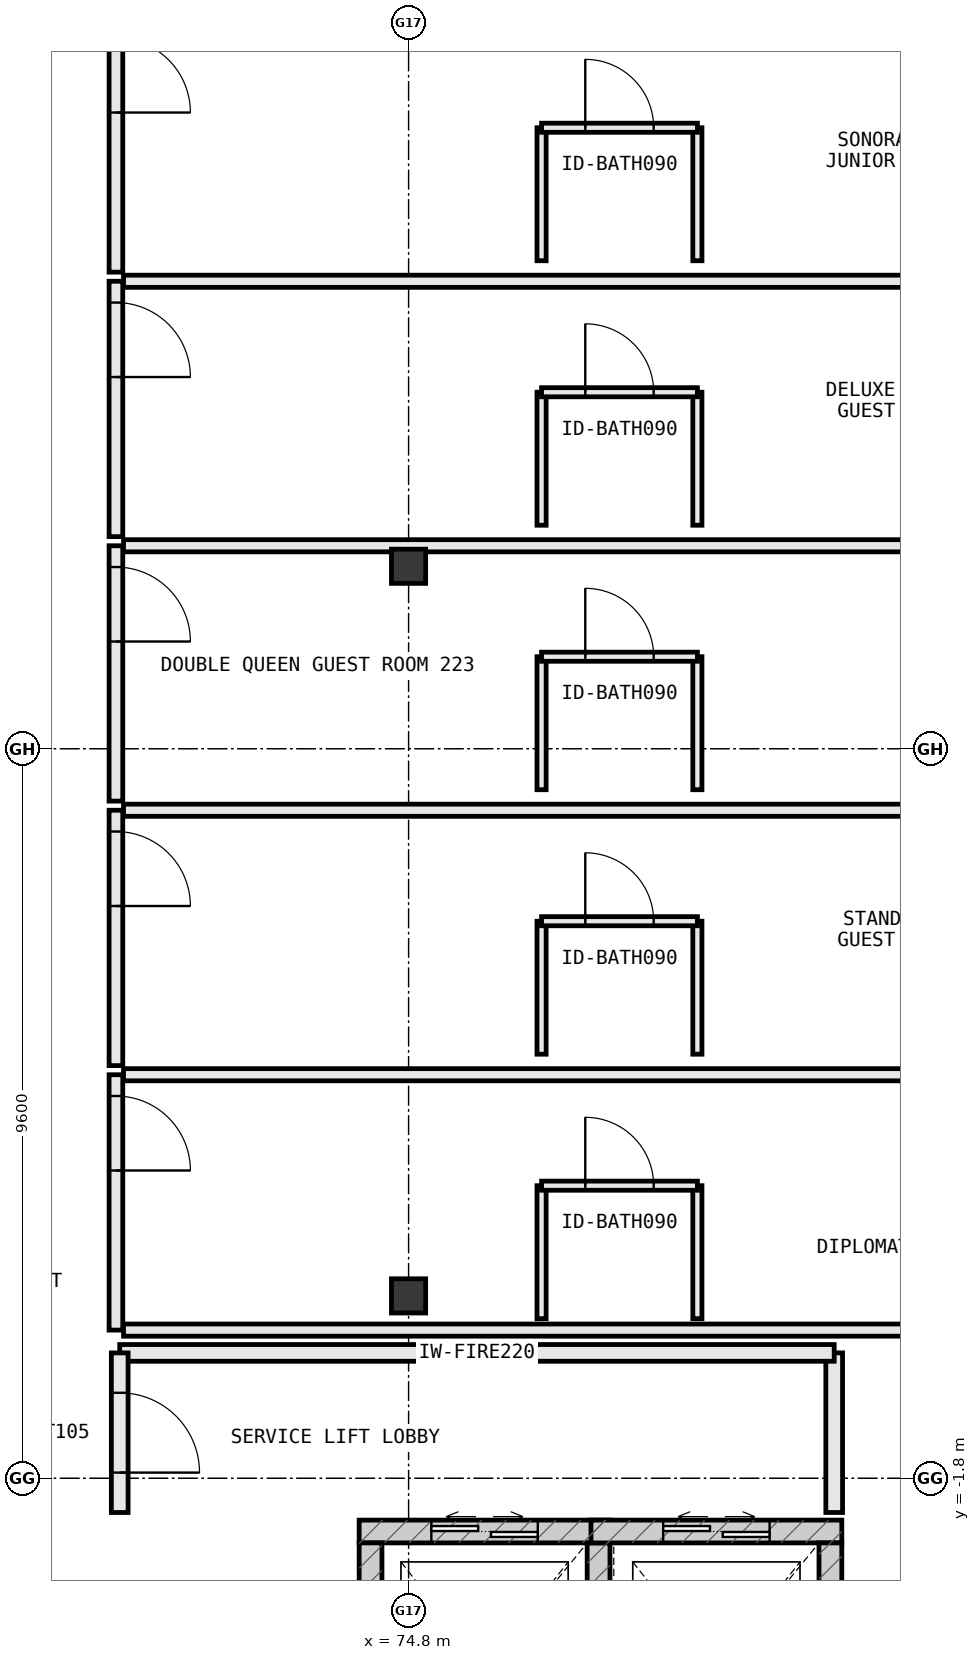
"""IFC4 building model, lengths in metres.
Left out: names, types, materials, properties, quantities, classifications, styles, units other than length and angle.
Written with IfcOpenShell. Run it as: python <this file> out.ifc"""

import sys

from ifc_helpers import new_model, si_unit, direction, frame, frame_2d, origin, origin_2d, place, context, subcontext, project, spatial, rectangle, extrude, element, fill, save


model = new_model("IFC4")
c1 = context("Model", 3, precision=1e-05, world=origin(), true_north=direction((0.0, 1.0)))
c2 = subcontext(c1, "Body", "Model", "MODEL_VIEW")
j1 = project(units=[si_unit("LENGTHUNIT", "METRE"), si_unit("PLANEANGLEUNIT", "RADIAN")], contexts=[c1])
p1 = place(None, origin())
s1 = spatial("IfcSite", under=j1, at=p1, CompositionType="ELEMENT")
p2 = place(p1, origin())
s2 = spatial("IfcBuilding", under=s1, at=p2, CompositionType="ELEMENT")
p3 = place(p2, frame((0.0, 0.0, 31.4)))
s3 = spatial("IfcBuildingStorey", under=s2, at=p3, CompositionType="ELEMENT", Elevation=31.4)
for number, where, z_axis, x_axis in (
    (1, (74.8, 0.6, 0.0), (0.0, 0.0, 1.0), (1.0, 0.0, 0.0)),
    (2, (74.8, 10.2, 0.0), (0.0, 0.0, 1.0), (1.0, 0.0, 0.0)),
):
    element("IfcColumn", number, at=place(p3, frame(where, z_axis=z_axis, x_axis=x_axis)), inside=s3, PredefinedType="COLUMN", context=c2, shape_type="SweptSolid", body=[
        extrude(rectangle(XDim=0.45, YDim=0.45, at=origin_2d()), origin(), (0.0, 0.0, 1.0), 3.8),
    ])
p4 = place(p3, frame((77.45, -2.5, 0.0), z_axis=(0.0, 0.0, 1.0), x_axis=(-1.0, 0.0, 0.0)))
e3 = element("IfcWall", 3, at=p4, inside=s3, PredefinedType="SHEAR", context=c2, shape_type="SweptSolid", body=[
    extrude(rectangle(XDim=3.3, YDim=0.3, at=frame_2d((1.65, 0.0))), origin(), (0.0, 0.0, 1.0), 3.8),
])
p5 = place(p4, frame((0.95, 0.0, 0.0)))
e4 = element("IfcOpeningElement", 4, at=p5, cuts=e3, PredefinedType="OPENING", context=c2, shape_type="SweptSolid", body=[
    extrude(rectangle(XDim=1.4, YDim=2.2, at=frame_2d((0.7, 1.1))), frame((0.0, 0.162, 0.0), z_axis=(0.0, -1.0, 0.0), x_axis=(1.0, 0.0, 0.0)), (0.0, 0.0, 1.0), 0.324),
])
for number, where, z_axis, x_axis in (
    (5, (77.3, -5.95, 0.0), (0.0, 0.0, 1.0), (0.0, 1.0, 0.0)),
    (6, (74.3, -2.65, 0.0), (0.0, 0.0, 1.0), (0.0, -1.0, 0.0)),
):
    element("IfcWall", number, at=place(p3, frame(where, z_axis=z_axis, x_axis=x_axis)), inside=s3, PredefinedType="SHEAR", context=c2, shape_type="SweptSolid", body=[
        extrude(rectangle(XDim=3.3, YDim=0.3, at=frame_2d((1.65, 0.0))), origin(), (0.0, 0.0, 1.0), 3.8),
    ])
p6 = place(p3, frame((80.5, -2.5, 0.0), z_axis=(0.0, 0.0, 1.0), x_axis=(-1.0, 0.0, 0.0)))
e7 = element("IfcWall", 7, at=p6, inside=s3, PredefinedType="SHEAR", context=c2, shape_type="SweptSolid", body=[
    extrude(rectangle(XDim=3.3, YDim=0.3, at=frame_2d((1.65, 0.0))), origin(), (0.0, 0.0, 1.0), 3.8),
])
p7 = place(p6, frame((0.95, 0.0, 0.0)))
e8 = element("IfcOpeningElement", 8, at=p7, cuts=e7, PredefinedType="OPENING", context=c2, shape_type="SweptSolid", body=[
    extrude(rectangle(XDim=1.4, YDim=2.2, at=frame_2d((0.7, 1.1))), frame((0.0, 0.162, 0.0), z_axis=(0.0, -1.0, 0.0), x_axis=(1.0, 0.0, 0.0)), (0.0, 0.0, 1.0), 0.324),
])
p8 = place(p3, frame((80.35, -5.95, 0.0), z_axis=(0.0, 0.0, 1.0), x_axis=(0.0, 1.0, 0.0)))
e9 = element("IfcWall", 9, at=p8, inside=s3, PredefinedType="SHEAR", context=c2, shape_type="SweptSolid", body=[
    extrude(rectangle(XDim=3.3, YDim=0.3, at=frame_2d((1.65, 0.0))), origin(), (0.0, 0.0, 1.0), 3.8),
])
p9 = place(p3, frame((80.4, -2.25, 0.0), z_axis=(0.0, 0.0, 1.0), x_axis=(0.0, 1.0, 0.0)))
e10 = element("IfcWall", 10, at=p9, inside=s3, PredefinedType="STANDARD", context=c2, shape_type="SweptSolid", body=[
    extrude(rectangle(XDim=2.1, YDim=0.22, at=frame_2d((1.05, 0.0))), origin(), (0.0, 0.0, 1.0), 3.555),
])
p10 = place(p3, frame((80.4, -0.15, 0.0), z_axis=(0.0, 0.0, 1.0), x_axis=(-1.0, 0.0, 0.0)))
e11 = element("IfcWall", 11, at=p10, inside=s3, PredefinedType="STANDARD", context=c2, shape_type="SweptSolid", body=[
    extrude(rectangle(XDim=9.4, YDim=0.22, at=frame_2d((4.7, 0.0))), origin(), (0.0, 0.0, 1.0), 3.555),
])
p11 = place(p3, frame((71.0, -0.15, 0.0), z_axis=(0.0, 0.0, 1.0), x_axis=(0.0, -1.0, 0.0)))
e12 = element("IfcWall", 12, at=p11, inside=s3, PredefinedType="STANDARD", context=c2, shape_type="SweptSolid", body=[
    extrude(rectangle(XDim=2.1, YDim=0.22, at=frame_2d((1.05, 0.0))), origin(), (0.0, 0.0, 1.0), 3.555),
])
p12 = place(p11, frame((0.525, 0.0, 0.0)))
e13 = element("IfcOpeningElement", 13, at=p12, cuts=e12, PredefinedType="OPENING", context=c2, shape_type="SweptSolid", body=[
    extrude(rectangle(XDim=1.05, YDim=2.2, at=frame_2d((0.525, 1.1))), frame((0.0, 0.122, 0.0), z_axis=(0.0, -1.0, 0.0), x_axis=(1.0, 0.0, 0.0)), (0.0, 0.0, 1.0), 0.244),
])
p13 = place(p3, frame((70.95, 3.51, 0.0), z_axis=(0.0, 0.0, 1.0), x_axis=(0.0, -1.0, 0.0)))
e14 = element("IfcWall", 14, at=p13, inside=s3, PredefinedType="PARTITIONING", context=c2, shape_type="SweptSolid", body=[
    extrude(rectangle(XDim=3.36, YDim=0.18, at=frame_2d((1.68, 0.0))), origin(), (0.0, 0.0, 1.0), 3.555),
])
p14 = place(p13, frame((0.28, 0.0, 0.0)))
e15 = element("IfcOpeningElement", 15, at=p14, cuts=e14, PredefinedType="OPENING", context=c2, shape_type="SweptSolid", body=[
    extrude(rectangle(XDim=0.98, YDim=2.18, at=frame_2d((0.49, 1.09))), frame((0.0, 0.102, 0.0), z_axis=(0.0, -1.0, 0.0), x_axis=(1.0, 0.0, 0.0)), (0.0, 0.0, 1.0), 0.204),
])
for number, where, z_axis, x_axis in (
    (16, (71.05, 0.15, 0.0), (0.0, 0.0, 1.0), (1.0, 0.0, 0.0)),
    (17, (71.05, 3.51, 0.0), (0.0, 0.0, 1.0), (1.0, 0.0, 0.0)),
):
    element("IfcWall", number, at=place(p3, frame(where, z_axis=z_axis, x_axis=x_axis)), inside=s3, PredefinedType="PARTITIONING", context=c2, shape_type="SweptSolid", body=[
        extrude(rectangle(XDim=12.79, YDim=0.16, at=frame_2d((6.395, 0.0))), origin(), (0.0, 0.0, 1.0), 3.555),
    ])
for number, where, z_axis, x_axis in (
    (18, (76.55, 0.3, 0.0), (0.0, 0.0, 1.0), (0.0, 1.0, 0.0)),
    (19, (78.6, 0.3, 0.0), (0.0, 0.0, 1.0), (0.0, 1.0, 0.0)),
):
    element("IfcWall", number, at=place(p3, frame(where, z_axis=z_axis, x_axis=x_axis)), inside=s3, PredefinedType="PARTITIONING", context=c2, shape_type="SweptSolid", body=[
        extrude(rectangle(XDim=1.75, YDim=0.12, at=frame_2d((0.875, 0.0))), origin(), (0.0, 0.0, 1.0), 3.555),
    ])
p15 = place(p3, frame((76.55, 2.05, 0.0), z_axis=(0.0, 0.0, 1.0), x_axis=(1.0, 0.0, 0.0)))
e20 = element("IfcWall", 20, at=p15, inside=s3, PredefinedType="PARTITIONING", context=c2, shape_type="SweptSolid", body=[
    extrude(rectangle(XDim=2.05, YDim=0.12, at=frame_2d((1.025, 0.0))), origin(), (0.0, 0.0, 1.0), 3.555),
])
p16 = place(p15, frame((0.575, 0.0, 0.0)))
e21 = element("IfcOpeningElement", 21, at=p16, cuts=e20, PredefinedType="OPENING", context=c2, shape_type="SweptSolid", body=[
    extrude(rectangle(XDim=0.9, YDim=2.15, at=frame_2d((0.45, 1.075))), frame((0.0, 0.072, 0.0), z_axis=(0.0, -1.0, 0.0), x_axis=(1.0, 0.0, 0.0)), (0.0, 0.0, 1.0), 0.144),
])
p17 = place(p3, frame((70.95, 6.99, 0.0), z_axis=(0.0, 0.0, 1.0), x_axis=(0.0, -1.0, 0.0)))
e22 = element("IfcWall", 22, at=p17, inside=s3, PredefinedType="PARTITIONING", context=c2, shape_type="SweptSolid", body=[
    extrude(rectangle(XDim=3.36, YDim=0.18, at=frame_2d((1.68, 0.0))), origin(), (0.0, 0.0, 1.0), 3.555),
])
p18 = place(p17, frame((0.28, 0.0, 0.0)))
e23 = element("IfcOpeningElement", 23, at=p18, cuts=e22, PredefinedType="OPENING", context=c2, shape_type="SweptSolid", body=[
    extrude(rectangle(XDim=0.98, YDim=2.18, at=frame_2d((0.49, 1.09))), frame((0.0, 0.102, 0.0), z_axis=(0.0, -1.0, 0.0), x_axis=(1.0, 0.0, 0.0)), (0.0, 0.0, 1.0), 0.204),
])
p19 = place(p3, frame((71.05, 6.99, 0.0), z_axis=(0.0, 0.0, 1.0), x_axis=(1.0, 0.0, 0.0)))
e24 = element("IfcWall", 24, at=p19, inside=s3, PredefinedType="PARTITIONING", context=c2, shape_type="SweptSolid", body=[
    extrude(rectangle(XDim=12.79, YDim=0.16, at=frame_2d((6.395, 0.0))), origin(), (0.0, 0.0, 1.0), 3.555),
])
for number, where, z_axis, x_axis in (
    (25, (76.55, 3.78, 0.0), (0.0, 0.0, 1.0), (0.0, 1.0, 0.0)),
    (26, (78.6, 3.78, 0.0), (0.0, 0.0, 1.0), (0.0, 1.0, 0.0)),
):
    element("IfcWall", number, at=place(p3, frame(where, z_axis=z_axis, x_axis=x_axis)), inside=s3, PredefinedType="PARTITIONING", context=c2, shape_type="SweptSolid", body=[
        extrude(rectangle(XDim=1.75, YDim=0.12, at=frame_2d((0.875, 0.0))), origin(), (0.0, 0.0, 1.0), 3.555),
    ])
p20 = place(p3, frame((76.55, 5.53, 0.0), z_axis=(0.0, 0.0, 1.0), x_axis=(1.0, 0.0, 0.0)))
e27 = element("IfcWall", 27, at=p20, inside=s3, PredefinedType="PARTITIONING", context=c2, shape_type="SweptSolid", body=[
    extrude(rectangle(XDim=2.05, YDim=0.12, at=frame_2d((1.025, 0.0))), origin(), (0.0, 0.0, 1.0), 3.555),
])
p21 = place(p20, frame((0.575, 0.0, 0.0)))
e28 = element("IfcOpeningElement", 28, at=p21, cuts=e27, PredefinedType="OPENING", context=c2, shape_type="SweptSolid", body=[
    extrude(rectangle(XDim=0.9, YDim=2.15, at=frame_2d((0.45, 1.075))), frame((0.0, 0.072, 0.0), z_axis=(0.0, -1.0, 0.0), x_axis=(1.0, 0.0, 0.0)), (0.0, 0.0, 1.0), 0.144),
])
p22 = place(p3, frame((70.95, 10.47, 0.0), z_axis=(0.0, 0.0, 1.0), x_axis=(0.0, -1.0, 0.0)))
e29 = element("IfcWall", 29, at=p22, inside=s3, PredefinedType="PARTITIONING", context=c2, shape_type="SweptSolid", body=[
    extrude(rectangle(XDim=3.36, YDim=0.18, at=frame_2d((1.68, 0.0))), origin(), (0.0, 0.0, 1.0), 3.555),
])
p23 = place(p22, frame((0.28, 0.0, 0.0)))
e30 = element("IfcOpeningElement", 30, at=p23, cuts=e29, PredefinedType="OPENING", context=c2, shape_type="SweptSolid", body=[
    extrude(rectangle(XDim=0.98, YDim=2.18, at=frame_2d((0.49, 1.09))), frame((0.0, 0.102, 0.0), z_axis=(0.0, -1.0, 0.0), x_axis=(1.0, 0.0, 0.0)), (0.0, 0.0, 1.0), 0.204),
])
p24 = place(p3, frame((71.05, 10.47, 0.0), z_axis=(0.0, 0.0, 1.0), x_axis=(1.0, 0.0, 0.0)))
e31 = element("IfcWall", 31, at=p24, inside=s3, PredefinedType="PARTITIONING", context=c2, shape_type="SweptSolid", body=[
    extrude(rectangle(XDim=12.79, YDim=0.16, at=frame_2d((6.395, 0.0))), origin(), (0.0, 0.0, 1.0), 2.93),
])
for number, where, z_axis, x_axis in (
    (32, (76.55, 7.26, 0.0), (0.0, 0.0, 1.0), (0.0, 1.0, 0.0)),
    (33, (78.6, 7.26, 0.0), (0.0, 0.0, 1.0), (0.0, 1.0, 0.0)),
):
    element("IfcWall", number, at=place(p3, frame(where, z_axis=z_axis, x_axis=x_axis)), inside=s3, PredefinedType="PARTITIONING", context=c2, shape_type="SweptSolid", body=[
        extrude(rectangle(XDim=1.75, YDim=0.12, at=frame_2d((0.875, 0.0))), origin(), (0.0, 0.0, 1.0), 3.555),
    ])
p25 = place(p3, frame((76.55, 9.01, 0.0), z_axis=(0.0, 0.0, 1.0), x_axis=(1.0, 0.0, 0.0)))
e34 = element("IfcWall", 34, at=p25, inside=s3, PredefinedType="PARTITIONING", context=c2, shape_type="SweptSolid", body=[
    extrude(rectangle(XDim=2.05, YDim=0.12, at=frame_2d((1.025, 0.0))), origin(), (0.0, 0.0, 1.0), 3.555),
])
p26 = place(p25, frame((0.575, 0.0, 0.0)))
e35 = element("IfcOpeningElement", 35, at=p26, cuts=e34, PredefinedType="OPENING", context=c2, shape_type="SweptSolid", body=[
    extrude(rectangle(XDim=0.9, YDim=2.15, at=frame_2d((0.45, 1.075))), frame((0.0, 0.072, 0.0), z_axis=(0.0, -1.0, 0.0), x_axis=(1.0, 0.0, 0.0)), (0.0, 0.0, 1.0), 0.144),
])
p27 = place(p3, frame((70.95, 13.95, 0.0), z_axis=(0.0, 0.0, 1.0), x_axis=(0.0, -1.0, 0.0)))
e36 = element("IfcWall", 36, at=p27, inside=s3, PredefinedType="PARTITIONING", context=c2, shape_type="SweptSolid", body=[
    extrude(rectangle(XDim=3.36, YDim=0.18, at=frame_2d((1.68, 0.0))), origin(), (0.0, 0.0, 1.0), 3.555),
])
p28 = place(p27, frame((0.28, 0.0, 0.0)))
e37 = element("IfcOpeningElement", 37, at=p28, cuts=e36, PredefinedType="OPENING", context=c2, shape_type="SweptSolid", body=[
    extrude(rectangle(XDim=0.98, YDim=2.18, at=frame_2d((0.49, 1.09))), frame((0.0, 0.102, 0.0), z_axis=(0.0, -1.0, 0.0), x_axis=(1.0, 0.0, 0.0)), (0.0, 0.0, 1.0), 0.204),
])
p29 = place(p3, frame((71.05, 13.95, 0.0), z_axis=(0.0, 0.0, 1.0), x_axis=(1.0, 0.0, 0.0)))
e38 = element("IfcWall", 38, at=p29, inside=s3, PredefinedType="PARTITIONING", context=c2, shape_type="SweptSolid", body=[
    extrude(rectangle(XDim=12.79, YDim=0.16, at=frame_2d((6.395, 0.0))), origin(), (0.0, 0.0, 1.0), 3.555),
])
for number, where, z_axis, x_axis in (
    (39, (76.55, 10.74, 0.0), (0.0, 0.0, 1.0), (0.0, 1.0, 0.0)),
    (40, (78.6, 10.74, 0.0), (0.0, 0.0, 1.0), (0.0, 1.0, 0.0)),
):
    element("IfcWall", number, at=place(p3, frame(where, z_axis=z_axis, x_axis=x_axis)), inside=s3, PredefinedType="PARTITIONING", context=c2, shape_type="SweptSolid", body=[
        extrude(rectangle(XDim=1.75, YDim=0.12, at=frame_2d((0.875, 0.0))), origin(), (0.0, 0.0, 1.0), 3.555),
    ])
p30 = place(p3, frame((76.55, 12.49, 0.0), z_axis=(0.0, 0.0, 1.0), x_axis=(1.0, 0.0, 0.0)))
e41 = element("IfcWall", 41, at=p30, inside=s3, PredefinedType="PARTITIONING", context=c2, shape_type="SweptSolid", body=[
    extrude(rectangle(XDim=2.05, YDim=0.12, at=frame_2d((1.025, 0.0))), origin(), (0.0, 0.0, 1.0), 3.555),
])
p31 = place(p30, frame((0.575, 0.0, 0.0)))
e42 = element("IfcOpeningElement", 42, at=p31, cuts=e41, PredefinedType="OPENING", context=c2, shape_type="SweptSolid", body=[
    extrude(rectangle(XDim=0.9, YDim=2.15, at=frame_2d((0.45, 1.075))), frame((0.0, 0.072, 0.0), z_axis=(0.0, -1.0, 0.0), x_axis=(1.0, 0.0, 0.0)), (0.0, 0.0, 1.0), 0.144),
])
p32 = place(p3, frame((70.95, 17.43, 0.0), z_axis=(0.0, 0.0, 1.0), x_axis=(0.0, -1.0, 0.0)))
e43 = element("IfcWall", 43, at=p32, inside=s3, PredefinedType="PARTITIONING", context=c2, shape_type="SweptSolid", body=[
    extrude(rectangle(XDim=3.36, YDim=0.18, at=frame_2d((1.68, 0.0))), origin(), (0.0, 0.0, 1.0), 3.555),
])
p33 = place(p32, frame((0.28, 0.0, 0.0)))
e44 = element("IfcOpeningElement", 44, at=p33, cuts=e43, PredefinedType="OPENING", context=c2, shape_type="SweptSolid", body=[
    extrude(rectangle(XDim=0.98, YDim=2.18, at=frame_2d((0.49, 1.09))), frame((0.0, 0.102, 0.0), z_axis=(0.0, -1.0, 0.0), x_axis=(1.0, 0.0, 0.0)), (0.0, 0.0, 1.0), 0.204),
])
for number, where, z_axis, x_axis in (
    (45, (76.55, 14.22, 0.0), (0.0, 0.0, 1.0), (0.0, 1.0, 0.0)),
    (46, (78.6, 14.22, 0.0), (0.0, 0.0, 1.0), (0.0, 1.0, 0.0)),
):
    element("IfcWall", number, at=place(p3, frame(where, z_axis=z_axis, x_axis=x_axis)), inside=s3, PredefinedType="PARTITIONING", context=c2, shape_type="SweptSolid", body=[
        extrude(rectangle(XDim=1.75, YDim=0.12, at=frame_2d((0.875, 0.0))), origin(), (0.0, 0.0, 1.0), 3.555),
    ])
p34 = place(p3, frame((76.55, 15.97, 0.0), z_axis=(0.0, 0.0, 1.0), x_axis=(1.0, 0.0, 0.0)))
e47 = element("IfcWall", 47, at=p34, inside=s3, PredefinedType="PARTITIONING", context=c2, shape_type="SweptSolid", body=[
    extrude(rectangle(XDim=2.05, YDim=0.12, at=frame_2d((1.025, 0.0))), origin(), (0.0, 0.0, 1.0), 3.555),
])
p35 = place(p34, frame((0.575, 0.0, 0.0)))
e48 = element("IfcOpeningElement", 48, at=p35, cuts=e47, PredefinedType="OPENING", context=c2, shape_type="SweptSolid", body=[
    extrude(rectangle(XDim=0.9, YDim=2.15, at=frame_2d((0.45, 1.075))), frame((0.0, 0.072, 0.0), z_axis=(0.0, -1.0, 0.0), x_axis=(1.0, 0.0, 0.0)), (0.0, 0.0, 1.0), 0.144),
])
p36 = place(p5, origin())
e49 = element("IfcDoor", 49, at=p36, inside=s3, OperationType="DOUBLE_DOOR_SLIDING", PredefinedType="DOOR", context=c2, shape_type="SweptSolid", body=[
    extrude(rectangle(XDim=1.4, YDim=2.2, at=frame_2d((0.7, 1.1))), frame((0.0, 0.025, 0.0), z_axis=(0.0, -1.0, 0.0), x_axis=(1.0, 0.0, 0.0)), (0.0, 0.0, 1.0), 0.05),
])
fill(e4, e49)
p37 = place(p7, origin())
e50 = element("IfcDoor", 50, at=p37, inside=s3, OperationType="DOUBLE_DOOR_SLIDING", PredefinedType="DOOR", context=c2, shape_type="SweptSolid", body=[
    extrude(rectangle(XDim=1.4, YDim=2.2, at=frame_2d((0.7, 1.1))), frame((0.0, 0.025, 0.0), z_axis=(0.0, -1.0, 0.0), x_axis=(1.0, 0.0, 0.0)), (0.0, 0.0, 1.0), 0.05),
])
fill(e8, e50)
p38 = place(p12, origin())
e51 = element("IfcDoor", 51, at=p38, inside=s3, OperationType="SINGLE_SWING_RIGHT", PredefinedType="DOOR", context=c2, shape_type="SweptSolid", body=[
    extrude(rectangle(XDim=1.05, YDim=2.2, at=frame_2d((0.525, 1.1))), frame((0.0, 0.025, 0.0), z_axis=(0.0, -1.0, 0.0), x_axis=(1.0, 0.0, 0.0)), (0.0, 0.0, 1.0), 0.05),
])
fill(e13, e51)
p39 = place(p14, origin())
e52 = element("IfcDoor", 52, at=p39, inside=s3, OperationType="SINGLE_SWING_RIGHT", PredefinedType="DOOR", context=c2, shape_type="SweptSolid", body=[
    extrude(rectangle(XDim=0.98, YDim=2.18, at=frame_2d((0.49, 1.09))), frame((0.0, 0.025, 0.0), z_axis=(0.0, -1.0, 0.0), x_axis=(1.0, 0.0, 0.0)), (0.0, 0.0, 1.0), 0.05),
])
fill(e15, e52)
p40 = place(p16, origin())
e53 = element("IfcDoor", 53, at=p40, inside=s3, OperationType="SINGLE_SWING_LEFT", PredefinedType="DOOR", context=c2, shape_type="SweptSolid", body=[
    extrude(rectangle(XDim=0.9, YDim=2.15, at=frame_2d((0.45, 1.075))), frame((0.0, 0.025, 0.0), z_axis=(0.0, -1.0, 0.0), x_axis=(1.0, 0.0, 0.0)), (0.0, 0.0, 1.0), 0.05),
])
fill(e21, e53)
p41 = place(p18, origin())
e54 = element("IfcDoor", 54, at=p41, inside=s3, OperationType="SINGLE_SWING_RIGHT", PredefinedType="DOOR", context=c2, shape_type="SweptSolid", body=[
    extrude(rectangle(XDim=0.98, YDim=2.18, at=frame_2d((0.49, 1.09))), frame((0.0, 0.025, 0.0), z_axis=(0.0, -1.0, 0.0), x_axis=(1.0, 0.0, 0.0)), (0.0, 0.0, 1.0), 0.05),
])
fill(e23, e54)
p42 = place(p21, origin())
e55 = element("IfcDoor", 55, at=p42, inside=s3, OperationType="SINGLE_SWING_LEFT", PredefinedType="DOOR", context=c2, shape_type="SweptSolid", body=[
    extrude(rectangle(XDim=0.9, YDim=2.15, at=frame_2d((0.45, 1.075))), frame((0.0, 0.025, 0.0), z_axis=(0.0, -1.0, 0.0), x_axis=(1.0, 0.0, 0.0)), (0.0, 0.0, 1.0), 0.05),
])
fill(e28, e55)
p43 = place(p23, origin())
e56 = element("IfcDoor", 56, at=p43, inside=s3, OperationType="SINGLE_SWING_RIGHT", PredefinedType="DOOR", context=c2, shape_type="SweptSolid", body=[
    extrude(rectangle(XDim=0.98, YDim=2.18, at=frame_2d((0.49, 1.09))), frame((0.0, 0.025, 0.0), z_axis=(0.0, -1.0, 0.0), x_axis=(1.0, 0.0, 0.0)), (0.0, 0.0, 1.0), 0.05),
])
fill(e30, e56)
p44 = place(p26, origin())
e57 = element("IfcDoor", 57, at=p44, inside=s3, OperationType="SINGLE_SWING_LEFT", PredefinedType="DOOR", context=c2, shape_type="SweptSolid", body=[
    extrude(rectangle(XDim=0.9, YDim=2.15, at=frame_2d((0.45, 1.075))), frame((0.0, 0.025, 0.0), z_axis=(0.0, -1.0, 0.0), x_axis=(1.0, 0.0, 0.0)), (0.0, 0.0, 1.0), 0.05),
])
fill(e35, e57)
p45 = place(p28, origin())
e58 = element("IfcDoor", 58, at=p45, inside=s3, OperationType="SINGLE_SWING_RIGHT", PredefinedType="DOOR", context=c2, shape_type="SweptSolid", body=[
    extrude(rectangle(XDim=0.98, YDim=2.18, at=frame_2d((0.49, 1.09))), frame((0.0, 0.025, 0.0), z_axis=(0.0, -1.0, 0.0), x_axis=(1.0, 0.0, 0.0)), (0.0, 0.0, 1.0), 0.05),
])
fill(e37, e58)
p46 = place(p31, origin())
e59 = element("IfcDoor", 59, at=p46, inside=s3, OperationType="SINGLE_SWING_LEFT", PredefinedType="DOOR", context=c2, shape_type="SweptSolid", body=[
    extrude(rectangle(XDim=0.9, YDim=2.15, at=frame_2d((0.45, 1.075))), frame((0.0, 0.025, 0.0), z_axis=(0.0, -1.0, 0.0), x_axis=(1.0, 0.0, 0.0)), (0.0, 0.0, 1.0), 0.05),
])
fill(e42, e59)
p47 = place(p33, origin())
e60 = element("IfcDoor", 60, at=p47, inside=s3, OperationType="SINGLE_SWING_RIGHT", PredefinedType="DOOR", context=c2, shape_type="SweptSolid", body=[
    extrude(rectangle(XDim=0.98, YDim=2.18, at=frame_2d((0.49, 1.09))), frame((0.0, 0.025, 0.0), z_axis=(0.0, -1.0, 0.0), x_axis=(1.0, 0.0, 0.0)), (0.0, 0.0, 1.0), 0.05),
])
fill(e44, e60)
p48 = place(p35, origin())
e61 = element("IfcDoor", 61, at=p48, inside=s3, OperationType="SINGLE_SWING_LEFT", PredefinedType="DOOR", context=c2, shape_type="SweptSolid", body=[
    extrude(rectangle(XDim=0.9, YDim=2.15, at=frame_2d((0.45, 1.075))), frame((0.0, 0.025, 0.0), z_axis=(0.0, -1.0, 0.0), x_axis=(1.0, 0.0, 0.0)), (0.0, 0.0, 1.0), 0.05),
])
fill(e48, e61)
save(model, sys.argv[1])
